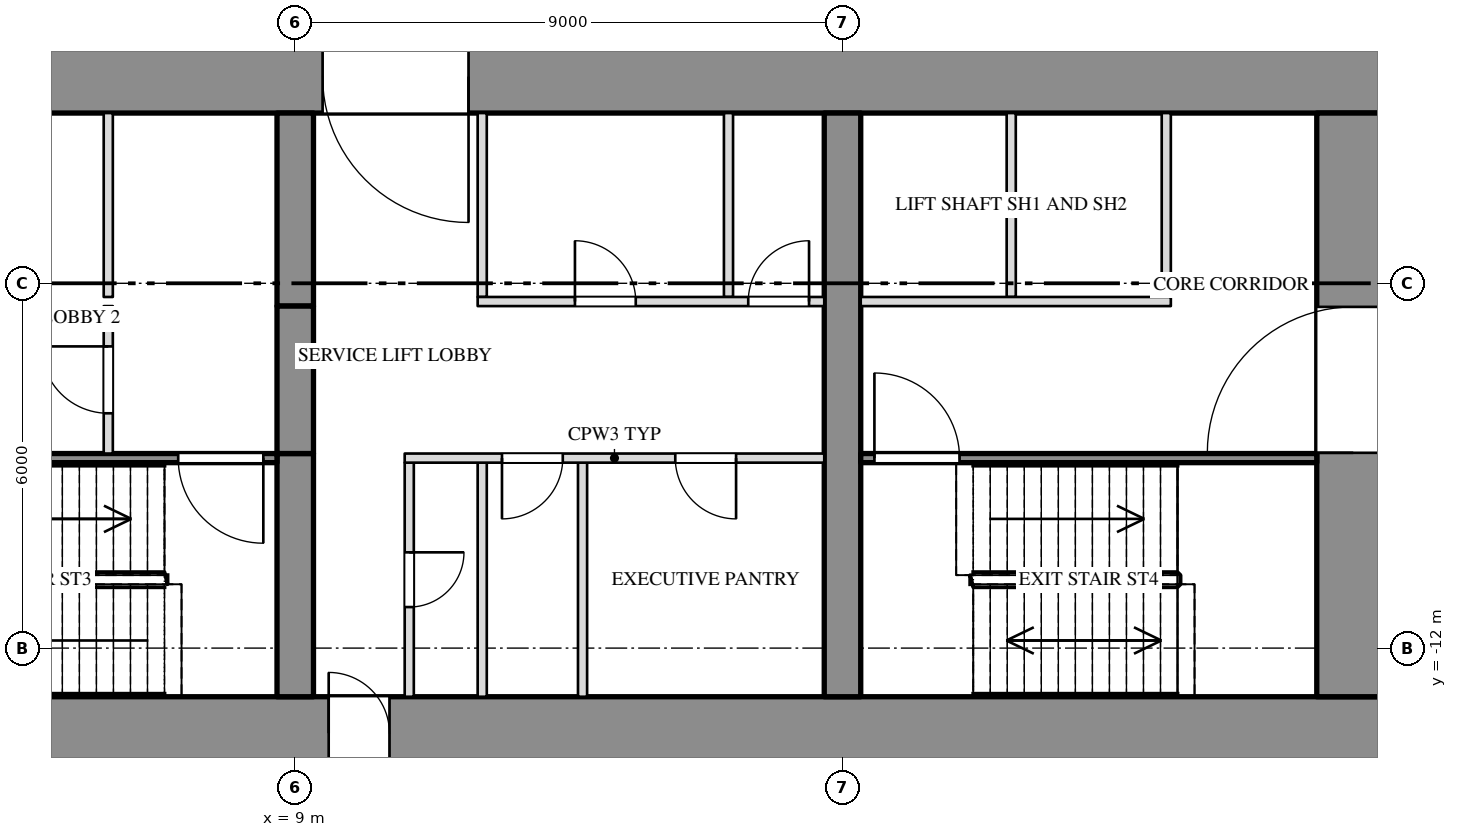
"""IFC4 building model, lengths in metres.
Left out: names, types, materials, properties, quantities, classifications, styles, units other than length and angle.
Written with IfcOpenShell. Run it as: python <this file> out.ifc"""

import sys

from ifc_helpers import new_model, si_unit, direction, frame, frame_2d, origin, place, context, subcontext, project, spatial, rectangle, extrude, element, fill, save


model = new_model("IFC4")
c1 = context("Model", 3, precision=1e-05, world=origin(), true_north=direction((0.0, 1.0)))
c2 = subcontext(c1, "Body", "Model", "MODEL_VIEW")
j1 = project(units=[si_unit("LENGTHUNIT", "METRE"), si_unit("PLANEANGLEUNIT", "RADIAN")], contexts=[c1])
p1 = place(None, origin())
s1 = spatial("IfcSite", under=j1, at=p1, CompositionType="ELEMENT")
p2 = place(p1, origin())
s2 = spatial("IfcBuilding", under=s1, at=p2, CompositionType="ELEMENT")
p3 = place(p2, frame((0.0, 0.0, 48.0)))
s3 = spatial("IfcBuildingStorey", under=s2, at=p3, CompositionType="ELEMENT", Elevation=48.0)
p4 = place(p3, frame((-27.0, -2.6, 0.0), z_axis=(0.0, 0.0, 1.0), x_axis=(1.0, 0.0, 0.0)))
e1 = element("IfcWall", 1, at=p4, inside=s3, PredefinedType="SHEAR", context=c2, shape_type="SweptSolid", body=[
    extrude(rectangle(XDim=54.0, YDim=1.2, at=frame_2d((27.0, 0.0))), origin(), (0.0, 0.0, 1.0), 4.3),
])
p5 = place(p4, frame((15.15, 0.0, 0.0)))
e2 = element("IfcOpeningElement", 2, at=p5, cuts=e1, PredefinedType="OPENING", context=c2, shape_type="SweptSolid", body=[
    extrude(rectangle(XDim=2.4, YDim=2.1, at=frame_2d((1.2, 1.05))), frame((0.0, 0.612, 0.0), z_axis=(0.0, -1.0, 0.0), x_axis=(1.0, 0.0, 0.0)), (0.0, 0.0, 1.0), 1.224),
])
p6 = place(p4, frame((36.45, 0.0, 0.0)))
e3 = element("IfcOpeningElement", 3, at=p6, cuts=e1, PredefinedType="OPENING", context=c2, shape_type="SweptSolid", body=[
    extrude(rectangle(XDim=2.4, YDim=2.1, at=frame_2d((1.2, 1.05))), frame((0.0, 0.612, 0.0), z_axis=(0.0, -1.0, 0.0), x_axis=(1.0, 0.0, 0.0)), (0.0, 0.0, 1.0), 1.224),
])
p7 = place(p3, frame((-27.0, -13.4, 0.0), z_axis=(0.0, 0.0, 1.0), x_axis=(1.0, 0.0, 0.0)))
e4 = element("IfcWall", 4, at=p7, inside=s3, PredefinedType="SHEAR", context=c2, shape_type="SweptSolid", body=[
    extrude(rectangle(XDim=54.0, YDim=1.2, at=frame_2d((27.0, 0.0))), origin(), (0.0, 0.0, 1.0), 4.3),
])
p8 = place(p7, frame((16.45, 0.0, 0.0)))
e5 = element("IfcOpeningElement", 5, at=p8, cuts=e4, PredefinedType="OPENING", context=c2, shape_type="SweptSolid", body=[
    extrude(rectangle(XDim=1.0, YDim=2.1, at=frame_2d((0.5, 1.05))), frame((0.0, 0.612, 0.0), z_axis=(0.0, -1.0, 0.0), x_axis=(1.0, 0.0, 0.0)), (0.0, 0.0, 1.0), 1.224),
])
p9 = place(p7, frame((36.55, 0.0, 0.0)))
e6 = element("IfcOpeningElement", 6, at=p9, cuts=e4, PredefinedType="OPENING", context=c2, shape_type="SweptSolid", body=[
    extrude(rectangle(XDim=1.0, YDim=2.1, at=frame_2d((0.5, 1.05))), frame((0.0, 0.612, 0.0), z_axis=(0.0, -1.0, 0.0), x_axis=(1.0, 0.0, 0.0)), (0.0, 0.0, 1.0), 1.224),
])
p10 = place(p3, frame((26.4, -12.8, 0.0), z_axis=(0.0, 0.0, 1.0), x_axis=(0.0, 1.0, 0.0)))
e7 = element("IfcWall", 7, at=p10, inside=s3, PredefinedType="SHEAR", context=c2, shape_type="SweptSolid", body=[
    extrude(rectangle(XDim=9.6, YDim=1.2, at=frame_2d((4.8, 0.0))), origin(), (0.0, 0.0, 1.0), 4.3),
])
p11 = place(p10, frame((4.012, 0.0, 0.0)))
e8 = element("IfcOpeningElement", 8, at=p11, cuts=e7, PredefinedType="OPENING", context=c2, shape_type="SweptSolid", body=[
    extrude(rectangle(XDim=2.4, YDim=2.1, at=frame_2d((1.2, 1.05))), frame((0.0, 0.612, 0.0), z_axis=(0.0, -1.0, 0.0), x_axis=(1.0, 0.0, 0.0)), (0.0, 0.0, 1.0), 1.224),
])
p12 = place(p3, frame((9.0, -12.8, 0.0), z_axis=(0.0, 0.0, 1.0), x_axis=(0.0, 1.0, 0.0)))
e9 = element("IfcWall", 9, at=p12, inside=s3, PredefinedType="SHEAR", context=c2, shape_type="SweptSolid", body=[
    extrude(rectangle(XDim=4.0, YDim=0.6, at=frame_2d((2.0, 0.0))), origin(), (0.0, 0.0, 1.0), 4.3),
])
p13 = place(p3, frame((9.0, -6.375, 0.0), z_axis=(0.0, 0.0, 1.0), x_axis=(0.0, 1.0, 0.0)))
e10 = element("IfcWall", 10, at=p13, inside=s3, PredefinedType="SHEAR", context=c2, shape_type="SweptSolid", body=[
    extrude(rectangle(XDim=3.175, YDim=0.6, at=frame_2d((1.587, 0.0))), origin(), (0.0, 0.0, 1.0), 4.3),
])
p14 = place(p3, frame((9.0, -8.8, 3.6), z_axis=(0.0, 0.0, 1.0), x_axis=(0.0, 1.0, 0.0)))
e11 = element("IfcWall", 11, at=p14, inside=s3, PredefinedType="SHEAR", context=c2, shape_type="SweptSolid", body=[
    extrude(rectangle(XDim=2.425, YDim=0.6, at=frame_2d((1.212, 0.0))), origin(), (0.0, 0.0, 1.0), 0.7),
])
p15 = place(p3, frame((18.0, -12.8, 0.0), z_axis=(0.0, 0.0, 1.0), x_axis=(0.0, 1.0, 0.0)))
e12 = element("IfcWall", 12, at=p15, inside=s3, PredefinedType="SHEAR", context=c2, shape_type="SweptSolid", body=[
    extrude(rectangle(XDim=9.6, YDim=0.6, at=frame_2d((4.8, 0.0))), origin(), (0.0, 0.0, 1.0), 4.3),
])
for number, where, z_axis, x_axis in (
    (13, (5.925, -6.225, 0.0), (0.0, 0.0, 1.0), (0.0, 1.0, 0.0)),
    (14, (12.075, -6.225, 0.0), (0.0, 0.0, 1.0), (0.0, 1.0, 0.0)),
    (15, (16.125, -6.225, 0.0), (0.0, 0.0, 1.0), (0.0, 1.0, 0.0)),
    (16, (20.775, -6.225, 0.0), (0.0, 0.0, 1.0), (0.0, 1.0, 0.0)),
    (17, (23.325, -6.225, 0.0), (0.0, 0.0, 1.0), (0.0, 1.0, 0.0)),
):
    element("IfcWall", number, at=place(p3, frame(where, z_axis=z_axis, x_axis=x_axis)), inside=s3, PredefinedType="PARTITIONING", context=c2, shape_type="SweptSolid", body=[
        extrude(rectangle(XDim=3.025, YDim=0.15, at=frame_2d((1.513, 0.0))), origin(), (0.0, 0.0, 1.0), 4.3),
    ])
p16 = place(p3, frame((10.875, -12.8, 0.0), z_axis=(0.0, 0.0, 1.0), x_axis=(0.0, 1.0, 0.0)))
e18 = element("IfcWall", 18, at=p16, inside=s3, PredefinedType="PARTITIONING", context=c2, shape_type="SweptSolid", body=[
    extrude(rectangle(XDim=3.85, YDim=0.15, at=frame_2d((1.925, 0.0))), origin(), (0.0, 0.0, 1.0), 4.3),
])
p17 = place(p16, frame((1.475, 0.0, 0.0)))
e19 = element("IfcOpeningElement", 19, at=p17, cuts=e18, PredefinedType="OPENING", context=c2, shape_type="SweptSolid", body=[
    extrude(rectangle(XDim=0.9, YDim=2.1, at=frame_2d((0.45, 1.05))), frame((0.0, 0.087, 0.0), z_axis=(0.0, -1.0, 0.0), x_axis=(1.0, 0.0, 0.0)), (0.0, 0.0, 1.0), 0.174),
])
for number, where, z_axis, x_axis in (
    (20, (12.075, -12.8, 0.0), (0.0, 0.0, 1.0), (0.0, 1.0, 0.0)),
    (21, (13.725, -12.8, 0.0), (0.0, 0.0, 1.0), (0.0, 1.0, 0.0)),
):
    element("IfcWall", number, at=place(p3, frame(where, z_axis=z_axis, x_axis=x_axis)), inside=s3, PredefinedType="PARTITIONING", context=c2, shape_type="SweptSolid", body=[
        extrude(rectangle(XDim=3.85, YDim=0.15, at=frame_2d((1.925, 0.0))), origin(), (0.0, 0.0, 1.0), 4.3),
    ])
p18 = place(p3, frame((5.925, -8.8, 0.0), z_axis=(0.0, 0.0, 1.0), x_axis=(0.0, 1.0, 0.0)))
e22 = element("IfcWall", 22, at=p18, inside=s3, PredefinedType="PARTITIONING", context=c2, shape_type="SweptSolid", body=[
    extrude(rectangle(XDim=2.425, YDim=0.15, at=frame_2d((1.212, 0.0))), origin(), (0.0, 0.0, 1.0), 4.3),
])
p19 = place(p18, frame((0.662, 0.0, 0.0)))
e23 = element("IfcOpeningElement", 23, at=p19, cuts=e22, PredefinedType="OPENING", context=c2, shape_type="SweptSolid", body=[
    extrude(rectangle(XDim=1.1, YDim=2.1, at=frame_2d((0.55, 1.05))), frame((0.0, 0.087, 0.0), z_axis=(0.0, -1.0, 0.0), x_axis=(1.0, 0.0, 0.0)), (0.0, 0.0, 1.0), 0.174),
])
p20 = place(p3, frame((12.0, -6.3, 0.0), z_axis=(0.0, 0.0, 1.0), x_axis=(1.0, 0.0, 0.0)))
e24 = element("IfcWall", 24, at=p20, inside=s3, PredefinedType="PARTITIONING", context=c2, shape_type="SweptSolid", body=[
    extrude(rectangle(XDim=5.7, YDim=0.15, at=frame_2d((2.85, 0.0))), origin(), (0.0, 0.0, 1.0), 4.3),
])
p21 = place(p20, frame((1.6, 0.0, 0.0)))
e25 = element("IfcOpeningElement", 25, at=p21, cuts=e24, PredefinedType="OPENING", context=c2, shape_type="SweptSolid", body=[
    extrude(rectangle(XDim=1.0, YDim=2.1, at=frame_2d((0.5, 1.05))), frame((0.0, 0.087, 0.0), z_axis=(0.0, -1.0, 0.0), x_axis=(1.0, 0.0, 0.0)), (0.0, 0.0, 1.0), 0.174),
])
p22 = place(p20, frame((4.45, 0.0, 0.0)))
e26 = element("IfcOpeningElement", 26, at=p22, cuts=e24, PredefinedType="OPENING", context=c2, shape_type="SweptSolid", body=[
    extrude(rectangle(XDim=1.0, YDim=2.1, at=frame_2d((0.5, 1.05))), frame((0.0, 0.087, 0.0), z_axis=(0.0, -1.0, 0.0), x_axis=(1.0, 0.0, 0.0)), (0.0, 0.0, 1.0), 0.174),
])
p23 = place(p3, frame((18.3, -6.3, 0.0), z_axis=(0.0, 0.0, 1.0), x_axis=(1.0, 0.0, 0.0)))
e27 = element("IfcWall", 27, at=p23, inside=s3, PredefinedType="PARTITIONING", context=c2, shape_type="SweptSolid", body=[
    extrude(rectangle(XDim=5.1, YDim=0.15, at=frame_2d((2.55, 0.0))), origin(), (0.0, 0.0, 1.0), 4.3),
])
p24 = place(p3, frame((0.3, -8.875, 0.0), z_axis=(0.0, 0.0, 1.0), x_axis=(1.0, 0.0, 0.0)))
e28 = element("IfcWall", 28, at=p24, inside=s3, PredefinedType="SHEAR", context=c2, shape_type="SweptSolid", body=[
    extrude(rectangle(XDim=8.4, YDim=0.15, at=frame_2d((4.2, 0.0))), origin(), (0.0, 0.0, 1.0), 4.3),
])
p25 = place(p24, frame((6.775, 0.0, 0.0)))
e29 = element("IfcOpeningElement", 29, at=p25, cuts=e28, PredefinedType="OPENING", context=c2, shape_type="SweptSolid", body=[
    extrude(rectangle(XDim=1.4, YDim=2.1, at=frame_2d((0.7, 1.05))), frame((0.0, 0.087, 0.0), z_axis=(0.0, -1.0, 0.0), x_axis=(1.0, 0.0, 0.0)), (0.0, 0.0, 1.0), 0.174),
])
p26 = place(p3, frame((10.8, -8.875, 0.0), z_axis=(0.0, 0.0, 1.0), x_axis=(1.0, 0.0, 0.0)))
e30 = element("IfcWall", 30, at=p26, inside=s3, PredefinedType="PARTITIONING", context=c2, shape_type="SweptSolid", body=[
    extrude(rectangle(XDim=6.9, YDim=0.15, at=frame_2d((3.45, 0.0))), origin(), (0.0, 0.0, 1.0), 4.3),
])
p27 = place(p26, frame((1.6, 0.0, 0.0)))
e31 = element("IfcOpeningElement", 31, at=p27, cuts=e30, PredefinedType="OPENING", context=c2, shape_type="SweptSolid", body=[
    extrude(rectangle(XDim=1.0, YDim=2.1, at=frame_2d((0.5, 1.05))), frame((0.0, 0.087, 0.0), z_axis=(0.0, -1.0, 0.0), x_axis=(1.0, 0.0, 0.0)), (0.0, 0.0, 1.0), 0.174),
])
p28 = place(p26, frame((4.45, 0.0, 0.0)))
e32 = element("IfcOpeningElement", 32, at=p28, cuts=e30, PredefinedType="OPENING", context=c2, shape_type="SweptSolid", body=[
    extrude(rectangle(XDim=1.0, YDim=2.1, at=frame_2d((0.5, 1.05))), frame((0.0, 0.087, 0.0), z_axis=(0.0, -1.0, 0.0), x_axis=(1.0, 0.0, 0.0)), (0.0, 0.0, 1.0), 0.174),
])
p29 = place(p3, frame((18.3, -8.875, 0.0), z_axis=(0.0, 0.0, 1.0), x_axis=(1.0, 0.0, 0.0)))
e33 = element("IfcWall", 33, at=p29, inside=s3, PredefinedType="SHEAR", context=c2, shape_type="SweptSolid", body=[
    extrude(rectangle(XDim=7.5, YDim=0.15, at=frame_2d((3.75, 0.0))), origin(), (0.0, 0.0, 1.0), 4.3),
])
p30 = place(p29, frame((0.225, 0.0, 0.0)))
e34 = element("IfcOpeningElement", 34, at=p30, cuts=e33, PredefinedType="OPENING", context=c2, shape_type="SweptSolid", body=[
    extrude(rectangle(XDim=1.4, YDim=2.1, at=frame_2d((0.7, 1.05))), frame((0.0, 0.087, 0.0), z_axis=(0.0, -1.0, 0.0), x_axis=(1.0, 0.0, 0.0)), (0.0, 0.0, 1.0), 0.174),
])
p31 = place(p19, origin())
e35 = element("IfcDoor", 35, at=p31, inside=s3, OperationType="SINGLE_SWING_RIGHT", PredefinedType="DOOR", context=c2, shape_type="SweptSolid", body=[
    extrude(rectangle(XDim=1.1, YDim=2.1, at=frame_2d((0.55, 1.05))), frame((0.0, 0.025, 0.0), z_axis=(0.0, -1.0, 0.0), x_axis=(1.0, 0.0, 0.0)), (0.0, 0.0, 1.0), 0.05),
])
fill(e23, e35)
p32 = place(p25, origin())
e36 = element("IfcDoor", 36, at=p32, inside=s3, OperationType="DOUBLE_DOOR_SINGLE_SWING", PredefinedType="DOOR", context=c2, shape_type="SweptSolid", body=[
    extrude(rectangle(XDim=1.4, YDim=2.1, at=frame_2d((0.7, 1.05))), frame((0.0, 0.025, 0.0), z_axis=(0.0, -1.0, 0.0), x_axis=(1.0, 0.0, 0.0)), (0.0, 0.0, 1.0), 0.05),
])
fill(e29, e36)
p33 = place(p9, origin())
e37 = element("IfcDoor", 37, at=p33, inside=s3, OperationType="SINGLE_SWING_LEFT", PredefinedType="DOOR", context=c2, shape_type="SweptSolid", body=[
    extrude(rectangle(XDim=1.0, YDim=2.1, at=frame_2d((0.5, 1.05))), frame((0.0, 0.025, 0.0), z_axis=(0.0, -1.0, 0.0), x_axis=(1.0, 0.0, 0.0)), (0.0, 0.0, 1.0), 0.05),
])
fill(e6, e37)
p34 = place(p6, origin())
e38 = element("IfcDoor", 38, at=p34, inside=s3, OperationType="DOUBLE_DOOR_SINGLE_SWING", PredefinedType="DOOR", context=c2, shape_type="SweptSolid", body=[
    extrude(rectangle(XDim=2.4, YDim=2.1, at=frame_2d((1.2, 1.05))), frame((0.0, 0.025, 0.0), z_axis=(0.0, -1.0, 0.0), x_axis=(1.0, 0.0, 0.0)), (0.0, 0.0, 1.0), 0.05),
])
fill(e3, e38)
p35 = place(p17, origin())
e39 = element("IfcDoor", 39, at=p35, inside=s3, OperationType="SINGLE_SWING_LEFT", PredefinedType="DOOR", context=c2, shape_type="SweptSolid", body=[
    extrude(rectangle(XDim=0.9, YDim=2.1, at=frame_2d((0.45, 1.05))), frame((0.0, 0.025, 0.0), z_axis=(0.0, -1.0, 0.0), x_axis=(1.0, 0.0, 0.0)), (0.0, 0.0, 1.0), 0.05),
])
fill(e19, e39)
p36 = place(p27, origin())
e40 = element("IfcDoor", 40, at=p36, inside=s3, OperationType="SINGLE_SWING_RIGHT", PredefinedType="DOOR", context=c2, shape_type="SweptSolid", body=[
    extrude(rectangle(XDim=1.0, YDim=2.1, at=frame_2d((0.5, 1.05))), frame((0.0, 0.025, 0.0), z_axis=(0.0, -1.0, 0.0), x_axis=(1.0, 0.0, 0.0)), (0.0, 0.0, 1.0), 0.05),
])
fill(e31, e40)
p37 = place(p21, origin())
e41 = element("IfcDoor", 41, at=p37, inside=s3, OperationType="SINGLE_SWING_LEFT", PredefinedType="DOOR", context=c2, shape_type="SweptSolid", body=[
    extrude(rectangle(XDim=1.0, YDim=2.1, at=frame_2d((0.5, 1.05))), frame((0.0, 0.025, 0.0), z_axis=(0.0, -1.0, 0.0), x_axis=(1.0, 0.0, 0.0)), (0.0, 0.0, 1.0), 0.05),
])
fill(e25, e41)
p38 = place(p28, origin())
e42 = element("IfcDoor", 42, at=p38, inside=s3, OperationType="SINGLE_SWING_LEFT", PredefinedType="DOOR", context=c2, shape_type="SweptSolid", body=[
    extrude(rectangle(XDim=1.0, YDim=2.1, at=frame_2d((0.5, 1.05))), frame((0.0, 0.025, 0.0), z_axis=(0.0, -1.0, 0.0), x_axis=(1.0, 0.0, 0.0)), (0.0, 0.0, 1.0), 0.05),
])
fill(e32, e42)
p39 = place(p22, origin())
e43 = element("IfcDoor", 43, at=p39, inside=s3, OperationType="SINGLE_SWING_RIGHT", PredefinedType="DOOR", context=c2, shape_type="SweptSolid", body=[
    extrude(rectangle(XDim=1.0, YDim=2.1, at=frame_2d((0.5, 1.05))), frame((0.0, 0.025, 0.0), z_axis=(0.0, -1.0, 0.0), x_axis=(1.0, 0.0, 0.0)), (0.0, 0.0, 1.0), 0.05),
])
fill(e26, e43)
p40 = place(p30, origin())
e44 = element("IfcDoor", 44, at=p40, inside=s3, OperationType="DOUBLE_DOOR_SINGLE_SWING", PredefinedType="DOOR", context=c2, shape_type="SweptSolid", body=[
    extrude(rectangle(XDim=1.4, YDim=2.1, at=frame_2d((0.7, 1.05))), frame((0.0, 0.025, 0.0), z_axis=(0.0, -1.0, 0.0), x_axis=(1.0, 0.0, 0.0)), (0.0, 0.0, 1.0), 0.05),
])
fill(e34, e44)
p41 = place(p11, origin())
e45 = element("IfcDoor", 45, at=p41, inside=s3, OperationType="DOUBLE_DOOR_SINGLE_SWING", PredefinedType="DOOR", context=c2, shape_type="SweptSolid", body=[
    extrude(rectangle(XDim=2.4, YDim=2.1, at=frame_2d((1.2, 1.05))), frame((0.0, 0.025, 0.0), z_axis=(0.0, -1.0, 0.0), x_axis=(1.0, 0.0, 0.0)), (0.0, 0.0, 1.0), 0.05),
])
fill(e8, e45)
save(model, sys.argv[1])
